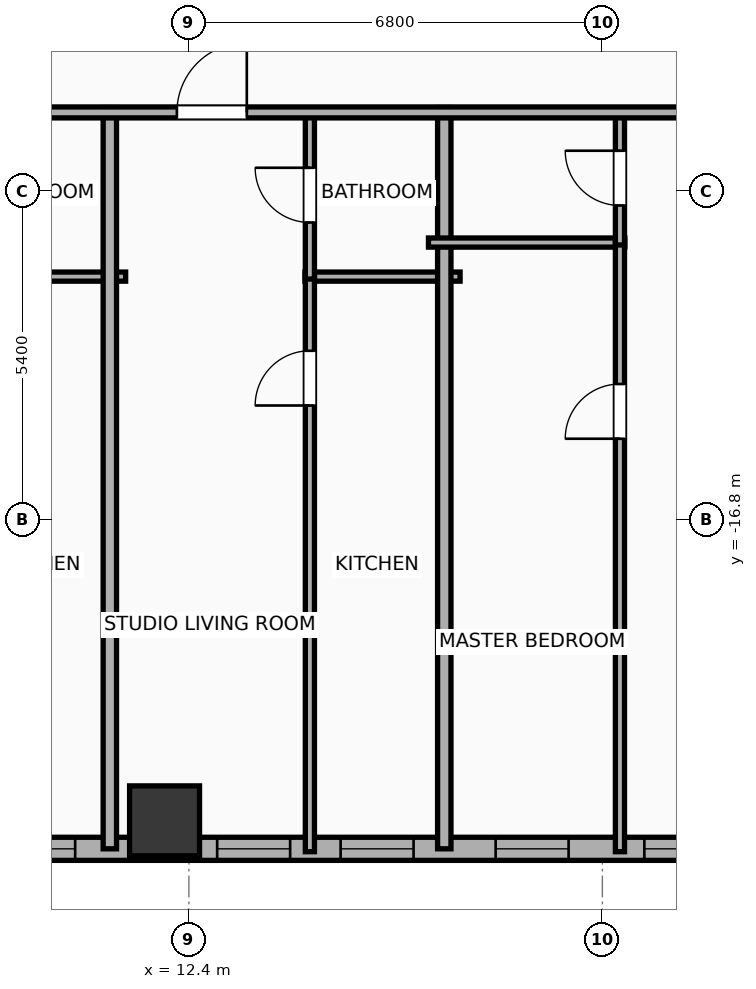
"""IFC4 building model, lengths in metres.
Left out: names, types, materials, properties, quantities, classifications, styles, units other than length and angle.
Written with IfcOpenShell. Run it as: python <this file> out.ifc"""

import sys

from ifc_helpers import new_model, si_unit, direction, frame, frame_2d, origin, origin_2d, place, context, subcontext, project, spatial, rectangle, hollow_rectangle, extrude, element, fill, save


model = new_model("IFC4")
c1 = context("Model", 3, precision=1e-05, world=origin(), true_north=direction((0.0, 1.0)))
c2 = subcontext(c1, "Body", "Model", "MODEL_VIEW")
j1 = project(units=[si_unit("LENGTHUNIT", "METRE"), si_unit("PLANEANGLEUNIT", "RADIAN")], contexts=[c1])
p1 = place(None, origin())
s1 = spatial("IfcSite", under=j1, at=p1, CompositionType="ELEMENT")
p2 = place(p1, origin())
s2 = spatial("IfcBuilding", under=s1, at=p2, CompositionType="ELEMENT")
p3 = place(p2, frame((0.0, 0.0, 45.5)))
s3 = spatial("IfcBuildingStorey", under=s2, at=p3, CompositionType="ELEMENT", Elevation=45.5)
p4 = place(p3, frame((12.0, -21.75, 0.0), z_axis=(0.0, 0.0, 1.0), x_axis=(1.0, 0.0, 0.0)))
e1 = element("IfcColumn", 1, at=p4, inside=s3, PredefinedType="COLUMN", context=c2, shape_type="SweptSolid", body=[
    extrude(hollow_rectangle(XDim=1.15, YDim=1.15, WallThickness=0.04, at=origin_2d()), origin(), (0.0, 0.0, 1.0), 3.9),
])
p5 = place(p3, frame((22.381, -22.21, 0.0), z_axis=(0.0, 0.0, 1.0), x_axis=(-1.0, 0.0, 0.0)))
e2 = element("IfcWall", 2, at=p5, inside=s3, PredefinedType="ELEMENTEDWALL", context=c2, shape_type="SweptSolid", body=[
    extrude(rectangle(XDim=51.963, YDim=0.38, at=frame_2d((25.981, 0.0))), origin(), (0.0, 0.0, 1.0), 3.65),
])
p6 = place(p5, frame((42.952, 0.0, 0.75)))
e3 = element("IfcOpeningElement", 3, at=p6, cuts=e2, PredefinedType="OPENING", context=c2, shape_type="SweptSolid", body=[
    extrude(rectangle(XDim=2.4, YDim=2.1, at=frame_2d((1.2, 1.05))), frame((0.0, 0.2, 0.0), z_axis=(0.0, -1.0, 0.0), x_axis=(1.0, 0.0, 0.0)), (0.0, 0.0, 1.0), 0.4),
])
p7 = place(p5, frame((49.847, 0.0, 0.75)))
e4 = element("IfcOpeningElement", 4, at=p7, cuts=e2, PredefinedType="OPENING", context=c2, shape_type="SweptSolid", body=[
    extrude(rectangle(XDim=1.2, YDim=2.05, at=frame_2d((0.6, 1.025))), frame((0.0, 0.2, 0.0), z_axis=(0.0, -1.0, 0.0), x_axis=(1.0, 0.0, 0.0)), (0.0, 0.0, 1.0), 0.4),
])
p8 = place(p5, frame((47.445, 0.0, 0.75)))
e5 = element("IfcOpeningElement", 5, at=p8, cuts=e2, PredefinedType="OPENING", context=c2, shape_type="SweptSolid", body=[
    extrude(rectangle(XDim=1.2, YDim=2.05, at=frame_2d((0.6, 1.025))), frame((0.0, 0.2, 0.0), z_axis=(0.0, -1.0, 0.0), x_axis=(1.0, 0.0, 0.0)), (0.0, 0.0, 1.0), 0.4),
])
p9 = place(p5, frame((39.526, 0.0, 0.75)))
e6 = element("IfcOpeningElement", 6, at=p9, cuts=e2, PredefinedType="OPENING", context=c2, shape_type="SweptSolid", body=[
    extrude(rectangle(XDim=1.2, YDim=2.05, at=frame_2d((0.6, 1.025))), frame((0.0, 0.2, 0.0), z_axis=(0.0, -1.0, 0.0), x_axis=(1.0, 0.0, 0.0)), (0.0, 0.0, 1.0), 0.4),
])
p10 = place(p5, frame((33.018, 0.0, 0.75)))
e7 = element("IfcOpeningElement", 7, at=p10, cuts=e2, PredefinedType="OPENING", context=c2, shape_type="SweptSolid", body=[
    extrude(rectangle(XDim=1.2, YDim=2.05, at=frame_2d((0.6, 1.025))), frame((0.0, 0.2, 0.0), z_axis=(0.0, -1.0, 0.0), x_axis=(1.0, 0.0, 0.0)), (0.0, 0.0, 1.0), 0.4),
])
p11 = place(p5, frame((36.813, 0.0, 0.75)))
e8 = element("IfcOpeningElement", 8, at=p11, cuts=e2, PredefinedType="OPENING", context=c2, shape_type="SweptSolid", body=[
    extrude(rectangle(XDim=1.2, YDim=2.05, at=frame_2d((0.6, 1.025))), frame((0.0, 0.2, 0.0), z_axis=(0.0, -1.0, 0.0), x_axis=(1.0, 0.0, 0.0)), (0.0, 0.0, 1.0), 0.4),
])
p12 = place(p5, frame((28.886, 0.0, 0.75)))
e9 = element("IfcOpeningElement", 9, at=p12, cuts=e2, PredefinedType="OPENING", context=c2, shape_type="SweptSolid", body=[
    extrude(rectangle(XDim=1.2, YDim=2.05, at=frame_2d((0.6, 1.025))), frame((0.0, 0.2, 0.0), z_axis=(0.0, -1.0, 0.0), x_axis=(1.0, 0.0, 0.0)), (0.0, 0.0, 1.0), 0.4),
])
p13 = place(p5, frame((23.306, 0.0, 0.75)))
e10 = element("IfcOpeningElement", 10, at=p13, cuts=e2, PredefinedType="OPENING", context=c2, shape_type="SweptSolid", body=[
    extrude(rectangle(XDim=1.2, YDim=2.05, at=frame_2d((0.6, 1.025))), frame((0.0, 0.2, 0.0), z_axis=(0.0, -1.0, 0.0), x_axis=(1.0, 0.0, 0.0)), (0.0, 0.0, 1.0), 0.4),
])
p14 = place(p5, frame((26.056, 0.0, 0.75)))
e11 = element("IfcOpeningElement", 11, at=p14, cuts=e2, PredefinedType="OPENING", context=c2, shape_type="SweptSolid", body=[
    extrude(rectangle(XDim=1.2, YDim=2.05, at=frame_2d((0.6, 1.025))), frame((0.0, 0.2, 0.0), z_axis=(0.0, -1.0, 0.0), x_axis=(1.0, 0.0, 0.0)), (0.0, 0.0, 1.0), 0.4),
])
p15 = place(p5, frame((18.811, 0.0, 0.75)))
e12 = element("IfcOpeningElement", 12, at=p15, cuts=e2, PredefinedType="OPENING", context=c2, shape_type="SweptSolid", body=[
    extrude(rectangle(XDim=1.2, YDim=2.05, at=frame_2d((0.6, 1.025))), frame((0.0, 0.2, 0.0), z_axis=(0.0, -1.0, 0.0), x_axis=(1.0, 0.0, 0.0)), (0.0, 0.0, 1.0), 0.4),
])
p16 = place(p5, frame((14.602, 0.0, 0.75)))
e13 = element("IfcOpeningElement", 13, at=p16, cuts=e2, PredefinedType="OPENING", context=c2, shape_type="SweptSolid", body=[
    extrude(rectangle(XDim=1.2, YDim=2.05, at=frame_2d((0.6, 1.025))), frame((0.0, 0.2, 0.0), z_axis=(0.0, -1.0, 0.0), x_axis=(1.0, 0.0, 0.0)), (0.0, 0.0, 1.0), 0.4),
])
p17 = place(p5, frame((11.852, 0.0, 0.75)))
e14 = element("IfcOpeningElement", 14, at=p17, cuts=e2, PredefinedType="OPENING", context=c2, shape_type="SweptSolid", body=[
    extrude(rectangle(XDim=1.2, YDim=2.05, at=frame_2d((0.6, 1.025))), frame((0.0, 0.2, 0.0), z_axis=(0.0, -1.0, 0.0), x_axis=(1.0, 0.0, 0.0)), (0.0, 0.0, 1.0), 0.4),
])
p18 = place(p5, frame((8.316, 0.0, 0.75)))
e15 = element("IfcOpeningElement", 15, at=p18, cuts=e2, PredefinedType="OPENING", context=c2, shape_type="SweptSolid", body=[
    extrude(rectangle(XDim=1.2, YDim=2.05, at=frame_2d((0.6, 1.025))), frame((0.0, 0.2, 0.0), z_axis=(0.0, -1.0, 0.0), x_axis=(1.0, 0.0, 0.0)), (0.0, 0.0, 1.0), 0.4),
])
p19 = place(p5, frame((6.286, 0.0, 0.75)))
e16 = element("IfcOpeningElement", 16, at=p19, cuts=e2, PredefinedType="OPENING", context=c2, shape_type="SweptSolid", body=[
    extrude(rectangle(XDim=1.2, YDim=2.05, at=frame_2d((0.6, 1.025))), frame((0.0, 0.2, 0.0), z_axis=(0.0, -1.0, 0.0), x_axis=(1.0, 0.0, 0.0)), (0.0, 0.0, 1.0), 0.4),
])
p20 = place(p5, frame((3.737, 0.0, 0.75)))
e17 = element("IfcOpeningElement", 17, at=p20, cuts=e2, PredefinedType="OPENING", context=c2, shape_type="SweptSolid", body=[
    extrude(rectangle(XDim=1.2, YDim=2.05, at=frame_2d((0.6, 1.025))), frame((0.0, 0.2, 0.0), z_axis=(0.0, -1.0, 0.0), x_axis=(1.0, 0.0, 0.0)), (0.0, 0.0, 1.0), 0.4),
])
p21 = place(p5, frame((1.291, 0.0, 0.75)))
e18 = element("IfcOpeningElement", 18, at=p21, cuts=e2, PredefinedType="OPENING", context=c2, shape_type="SweptSolid", body=[
    extrude(rectangle(XDim=1.2, YDim=2.05, at=frame_2d((0.6, 1.025))), frame((0.0, 0.2, 0.0), z_axis=(0.0, -1.0, 0.0), x_axis=(1.0, 0.0, 0.0)), (0.0, 0.0, 1.0), 0.4),
])
p22 = place(p3, frame((8.679, -12.8, 0.0), z_axis=(0.0, 0.0, 1.0), x_axis=(1.0, 0.0, 0.0)))
e19 = element("IfcWall", 19, at=p22, inside=s3, PredefinedType="PLUMBINGWALL", context=c2, shape_type="SweptSolid", body=[
    extrude(rectangle(XDim=2.681, YDim=0.15, at=frame_2d((1.341, 0.0))), origin(), (0.0, 0.0, 1.0), 3.65),
])
p23 = place(p3, frame((11.1, -22.21, 0.0), z_axis=(0.0, 0.0, 1.0), x_axis=(0.0, 1.0, 0.0)))
e20 = element("IfcWall", 20, at=p23, inside=s3, PredefinedType="PARTITIONING", context=c2, shape_type="SweptSolid", body=[
    extrude(rectangle(XDim=12.19, YDim=0.22, at=frame_2d((6.095, 0.0))), origin(), (0.0, 0.0, 1.0), 3.65),
])
p24 = place(p3, frame((14.31, -12.8, 0.0), z_axis=(0.0, 0.0, 1.0), x_axis=(1.0, 0.0, 0.0)))
e21 = element("IfcWall", 21, at=p24, inside=s3, PredefinedType="PLUMBINGWALL", context=c2, shape_type="SweptSolid", body=[
    extrude(rectangle(XDim=2.55, YDim=0.15, at=frame_2d((1.275, 0.0))), origin(), (0.0, 0.0, 1.0), 3.65),
])
p25 = place(p3, frame((14.39, -22.258, 0.0), z_axis=(0.0, 0.0, 1.0), x_axis=(0.0, 1.0, 0.0)))
e22 = element("IfcWall", 22, at=p25, inside=s3, PredefinedType="PLUMBINGWALL", context=c2, shape_type="SweptSolid", body=[
    extrude(rectangle(XDim=9.498, YDim=0.15, at=frame_2d((4.749, 0.0))), origin(), (0.0, 0.0, 1.0), 3.65),
])
p26 = place(p25, frame((7.338, 0.0, 0.0)))
e23 = element("IfcOpeningElement", 23, at=p26, cuts=e22, PredefinedType="OPENING", context=c2, shape_type="SweptSolid", body=[
    extrude(rectangle(XDim=0.9, YDim=2.05, at=frame_2d((0.45, 1.025))), frame((0.0, 0.085, 0.0), z_axis=(0.0, -1.0, 0.0), x_axis=(1.0, 0.0, 0.0)), (0.0, 0.0, 1.0), 0.17),
])
p27 = place(p3, frame((14.39, -12.84, 0.0), z_axis=(0.0, 0.0, 1.0), x_axis=(0.0, 1.0, 0.0)))
e24 = element("IfcWall", 24, at=p27, inside=s3, PredefinedType="PLUMBINGWALL", context=c2, shape_type="SweptSolid", body=[
    extrude(rectangle(XDim=2.76, YDim=0.15, at=frame_2d((1.38, 0.0))), origin(), (0.0, 0.0, 1.0), 3.65),
])
p28 = place(p27, frame((0.93, 0.0, 0.0)))
e25 = element("IfcOpeningElement", 25, at=p28, cuts=e24, PredefinedType="OPENING", context=c2, shape_type="SweptSolid", body=[
    extrude(rectangle(XDim=0.9, YDim=2.05, at=frame_2d((0.45, 1.025))), frame((0.0, 0.085, 0.0), z_axis=(0.0, -1.0, 0.0), x_axis=(1.0, 0.0, 0.0)), (0.0, 0.0, 1.0), 0.17),
])
p29 = place(p3, frame((16.6, -22.21, 0.0), z_axis=(0.0, 0.0, 1.0), x_axis=(0.0, 1.0, 0.0)))
e26 = element("IfcWall", 26, at=p29, inside=s3, PredefinedType="PARTITIONING", context=c2, shape_type="SweptSolid", body=[
    extrude(rectangle(XDim=12.19, YDim=0.22, at=frame_2d((6.095, 0.0))), origin(), (0.0, 0.0, 1.0), 3.65),
])
p30 = place(p3, frame((16.34, -12.24, 0.0), z_axis=(0.0, 0.0, 1.0), x_axis=(1.0, 0.0, 0.0)))
e27 = element("IfcWall", 27, at=p30, inside=s3, PredefinedType="PLUMBINGWALL", context=c2, shape_type="SweptSolid", body=[
    extrude(rectangle(XDim=3.229, YDim=0.15, at=frame_2d((1.615, 0.0))), origin(), (0.0, 0.0, 1.0), 3.65),
])
p31 = place(p3, frame((19.489, -22.258, 0.0), z_axis=(0.0, 0.0, 1.0), x_axis=(0.0, 1.0, 0.0)))
e28 = element("IfcWall", 28, at=p31, inside=s3, PredefinedType="PLUMBINGWALL", context=c2, shape_type="SweptSolid", body=[
    extrude(rectangle(XDim=10.058, YDim=0.15, at=frame_2d((5.029, 0.0))), origin(), (0.0, 0.0, 1.0), 3.65),
])
p32 = place(p31, frame((6.792, 0.0, 0.0)))
e29 = element("IfcOpeningElement", 29, at=p32, cuts=e28, PredefinedType="OPENING", context=c2, shape_type="SweptSolid", body=[
    extrude(rectangle(XDim=0.9, YDim=2.05, at=frame_2d((0.45, 1.025))), frame((0.0, 0.085, 0.0), z_axis=(0.0, -1.0, 0.0), x_axis=(1.0, 0.0, 0.0)), (0.0, 0.0, 1.0), 0.17),
])
p33 = place(p3, frame((19.489, -12.28, 0.0), z_axis=(0.0, 0.0, 1.0), x_axis=(0.0, 1.0, 0.0)))
e30 = element("IfcWall", 30, at=p33, inside=s3, PredefinedType="PLUMBINGWALL", context=c2, shape_type="SweptSolid", body=[
    extrude(rectangle(XDim=2.2, YDim=0.15, at=frame_2d((1.1, 0.0))), origin(), (0.0, 0.0, 1.0), 3.65),
])
p34 = place(p33, frame((0.65, 0.0, 0.0)))
e31 = element("IfcOpeningElement", 31, at=p34, cuts=e30, PredefinedType="OPENING", context=c2, shape_type="SweptSolid", body=[
    extrude(rectangle(XDim=0.9, YDim=2.05, at=frame_2d((0.45, 1.025))), frame((0.0, 0.085, 0.0), z_axis=(0.0, -1.0, 0.0), x_axis=(1.0, 0.0, 0.0)), (0.0, 0.0, 1.0), 0.17),
])
p35 = place(p3, frame((-33.41, -10.1, 0.0), z_axis=(0.0, 0.0, 1.0), x_axis=(1.0, 0.0, 0.0)))
e32 = element("IfcWall", 32, at=p35, inside=s3, PredefinedType="PARTITIONING", context=c2, shape_type="SweptSolid", body=[
    extrude(rectangle(XDim=59.62, YDim=0.18, at=frame_2d((29.81, 0.0))), origin(), (0.0, 0.0, 1.0), 3.65),
])
p36 = place(p35, frame((2.746, 0.0, 0.0)))
e33 = element("IfcOpeningElement", 33, at=p36, cuts=e32, PredefinedType="OPENING", context=c2, shape_type="SweptSolid", body=[
    extrude(rectangle(XDim=0.9, YDim=2.05, at=frame_2d((0.45, 1.025))), frame((0.0, 0.1, 0.0), z_axis=(0.0, -1.0, 0.0), x_axis=(1.0, 0.0, 0.0)), (0.0, 0.0, 1.0), 0.2),
])
p37 = place(p35, frame((11.552, 0.0, 0.0)))
e34 = element("IfcOpeningElement", 34, at=p37, cuts=e32, PredefinedType="OPENING", context=c2, shape_type="SweptSolid", body=[
    extrude(rectangle(XDim=1.15, YDim=2.05, at=frame_2d((0.575, 1.025))), frame((0.0, 0.1, 0.0), z_axis=(0.0, -1.0, 0.0), x_axis=(1.0, 0.0, 0.0)), (0.0, 0.0, 1.0), 0.2),
])
p38 = place(p35, frame((22.379, 0.0, 0.0)))
e35 = element("IfcOpeningElement", 35, at=p38, cuts=e32, PredefinedType="OPENING", context=c2, shape_type="SweptSolid", body=[
    extrude(rectangle(XDim=1.15, YDim=2.05, at=frame_2d((0.575, 1.025))), frame((0.0, 0.1, 0.0), z_axis=(0.0, -1.0, 0.0), x_axis=(1.0, 0.0, 0.0)), (0.0, 0.0, 1.0), 0.2),
])
p39 = place(p35, frame((31.28, 0.0, 0.0)))
e36 = element("IfcOpeningElement", 36, at=p39, cuts=e32, PredefinedType="OPENING", context=c2, shape_type="SweptSolid", body=[
    extrude(rectangle(XDim=1.15, YDim=2.05, at=frame_2d((0.575, 1.025))), frame((0.0, 0.1, 0.0), z_axis=(0.0, -1.0, 0.0), x_axis=(1.0, 0.0, 0.0)), (0.0, 0.0, 1.0), 0.2),
])
p40 = place(p35, frame((36.02, 0.0, 0.0)))
e37 = element("IfcOpeningElement", 37, at=p40, cuts=e32, PredefinedType="OPENING", context=c2, shape_type="SweptSolid", body=[
    extrude(rectangle(XDim=0.9, YDim=2.05, at=frame_2d((0.45, 1.025))), frame((0.0, 0.1, 0.0), z_axis=(0.0, -1.0, 0.0), x_axis=(1.0, 0.0, 0.0)), (0.0, 0.0, 1.0), 0.2),
])
p41 = place(p35, frame((40.044, 0.0, 0.0)))
e38 = element("IfcOpeningElement", 38, at=p41, cuts=e32, PredefinedType="OPENING", context=c2, shape_type="SweptSolid", body=[
    extrude(rectangle(XDim=1.15, YDim=2.05, at=frame_2d((0.575, 1.025))), frame((0.0, 0.1, 0.0), z_axis=(0.0, -1.0, 0.0), x_axis=(1.0, 0.0, 0.0)), (0.0, 0.0, 1.0), 0.2),
])
p42 = place(p35, frame((45.613, 0.0, 0.0)))
e39 = element("IfcOpeningElement", 39, at=p42, cuts=e32, PredefinedType="OPENING", context=c2, shape_type="SweptSolid", body=[
    extrude(rectangle(XDim=1.15, YDim=2.05, at=frame_2d((0.575, 1.025))), frame((0.0, 0.1, 0.0), z_axis=(0.0, -1.0, 0.0), x_axis=(1.0, 0.0, 0.0)), (0.0, 0.0, 1.0), 0.2),
])
p43 = place(p35, frame((54.174, 0.0, 0.0)))
e40 = element("IfcOpeningElement", 40, at=p43, cuts=e32, PredefinedType="OPENING", context=c2, shape_type="SweptSolid", body=[
    extrude(rectangle(XDim=1.15, YDim=2.05, at=frame_2d((0.575, 1.025))), frame((0.0, 0.1, 0.0), z_axis=(0.0, -1.0, 0.0), x_axis=(1.0, 0.0, 0.0)), (0.0, 0.0, 1.0), 0.2),
])
p44 = place(p17, origin())
e41 = element("IfcWindow", 41, at=p44, inside=s3, PartitioningType="SINGLE_PANEL", PredefinedType="WINDOW", context=c2, shape_type="SweptSolid", body=[
    extrude(rectangle(XDim=1.2, YDim=2.05, at=frame_2d((0.6, 1.025))), frame((0.0, 0.03, 0.0), z_axis=(0.0, -1.0, 0.0), x_axis=(1.0, 0.0, 0.0)), (0.0, 0.0, 1.0), 0.06),
])
fill(e14, e41)
p45 = place(p18, origin())
e42 = element("IfcWindow", 42, at=p45, inside=s3, PartitioningType="SINGLE_PANEL", PredefinedType="WINDOW", context=c2, shape_type="SweptSolid", body=[
    extrude(rectangle(XDim=1.2, YDim=2.05, at=frame_2d((0.6, 1.025))), frame((0.0, 0.03, 0.0), z_axis=(0.0, -1.0, 0.0), x_axis=(1.0, 0.0, 0.0)), (0.0, 0.0, 1.0), 0.06),
])
fill(e15, e42)
p46 = place(p19, origin())
e43 = element("IfcWindow", 43, at=p46, inside=s3, PartitioningType="SINGLE_PANEL", PredefinedType="WINDOW", context=c2, shape_type="SweptSolid", body=[
    extrude(rectangle(XDim=1.2, YDim=2.05, at=frame_2d((0.6, 1.025))), frame((0.0, 0.03, 0.0), z_axis=(0.0, -1.0, 0.0), x_axis=(1.0, 0.0, 0.0)), (0.0, 0.0, 1.0), 0.06),
])
fill(e16, e43)
p47 = place(p20, origin())
e44 = element("IfcWindow", 44, at=p47, inside=s3, PartitioningType="SINGLE_PANEL", PredefinedType="WINDOW", context=c2, shape_type="SweptSolid", body=[
    extrude(rectangle(XDim=1.2, YDim=2.05, at=frame_2d((0.6, 1.025))), frame((0.0, 0.03, 0.0), z_axis=(0.0, -1.0, 0.0), x_axis=(1.0, 0.0, 0.0)), (0.0, 0.0, 1.0), 0.06),
])
fill(e17, e44)
p48 = place(p21, origin())
e45 = element("IfcWindow", 45, at=p48, inside=s3, PartitioningType="SINGLE_PANEL", PredefinedType="WINDOW", context=c2, shape_type="SweptSolid", body=[
    extrude(rectangle(XDim=1.2, YDim=2.05, at=frame_2d((0.6, 1.025))), frame((0.0, 0.03, 0.0), z_axis=(0.0, -1.0, 0.0), x_axis=(1.0, 0.0, 0.0)), (0.0, 0.0, 1.0), 0.06),
])
fill(e18, e45)
p49 = place(p26, origin())
e46 = element("IfcDoor", 46, at=p49, inside=s3, OperationType="SINGLE_SWING_LEFT", PredefinedType="DOOR", context=c2, shape_type="SweptSolid", body=[
    extrude(rectangle(XDim=0.9, YDim=2.05, at=frame_2d((0.45, 1.025))), frame((0.0, 0.025, 0.0), z_axis=(0.0, -1.0, 0.0), x_axis=(1.0, 0.0, 0.0)), (0.0, 0.0, 1.0), 0.05),
])
fill(e23, e46)
p50 = place(p28, origin())
e47 = element("IfcDoor", 47, at=p50, inside=s3, OperationType="SINGLE_SWING_RIGHT", PredefinedType="DOOR", context=c2, shape_type="SweptSolid", body=[
    extrude(rectangle(XDim=0.9, YDim=2.05, at=frame_2d((0.45, 1.025))), frame((0.0, 0.025, 0.0), z_axis=(0.0, -1.0, 0.0), x_axis=(1.0, 0.0, 0.0)), (0.0, 0.0, 1.0), 0.05),
])
fill(e25, e47)
p51 = place(p32, origin())
e48 = element("IfcDoor", 48, at=p51, inside=s3, OperationType="SINGLE_SWING_LEFT", PredefinedType="DOOR", context=c2, shape_type="SweptSolid", body=[
    extrude(rectangle(XDim=0.9, YDim=2.05, at=frame_2d((0.45, 1.025))), frame((0.0, 0.025, 0.0), z_axis=(0.0, -1.0, 0.0), x_axis=(1.0, 0.0, 0.0)), (0.0, 0.0, 1.0), 0.05),
])
fill(e29, e48)
p52 = place(p34, origin())
e49 = element("IfcDoor", 49, at=p52, inside=s3, OperationType="SINGLE_SWING_RIGHT", PredefinedType="DOOR", context=c2, shape_type="SweptSolid", body=[
    extrude(rectangle(XDim=0.9, YDim=2.05, at=frame_2d((0.45, 1.025))), frame((0.0, 0.025, 0.0), z_axis=(0.0, -1.0, 0.0), x_axis=(1.0, 0.0, 0.0)), (0.0, 0.0, 1.0), 0.05),
])
fill(e31, e49)
p53 = place(p42, origin())
e50 = element("IfcDoor", 50, at=p53, inside=s3, OperationType="SINGLE_SWING_RIGHT", PredefinedType="DOOR", context=c2, shape_type="SweptSolid", body=[
    extrude(rectangle(XDim=1.15, YDim=2.05, at=frame_2d((0.575, 1.025))), frame((0.0, 0.025, 0.0), z_axis=(0.0, -1.0, 0.0), x_axis=(1.0, 0.0, 0.0)), (0.0, 0.0, 1.0), 0.05),
])
fill(e39, e50)
save(model, sys.argv[1])
